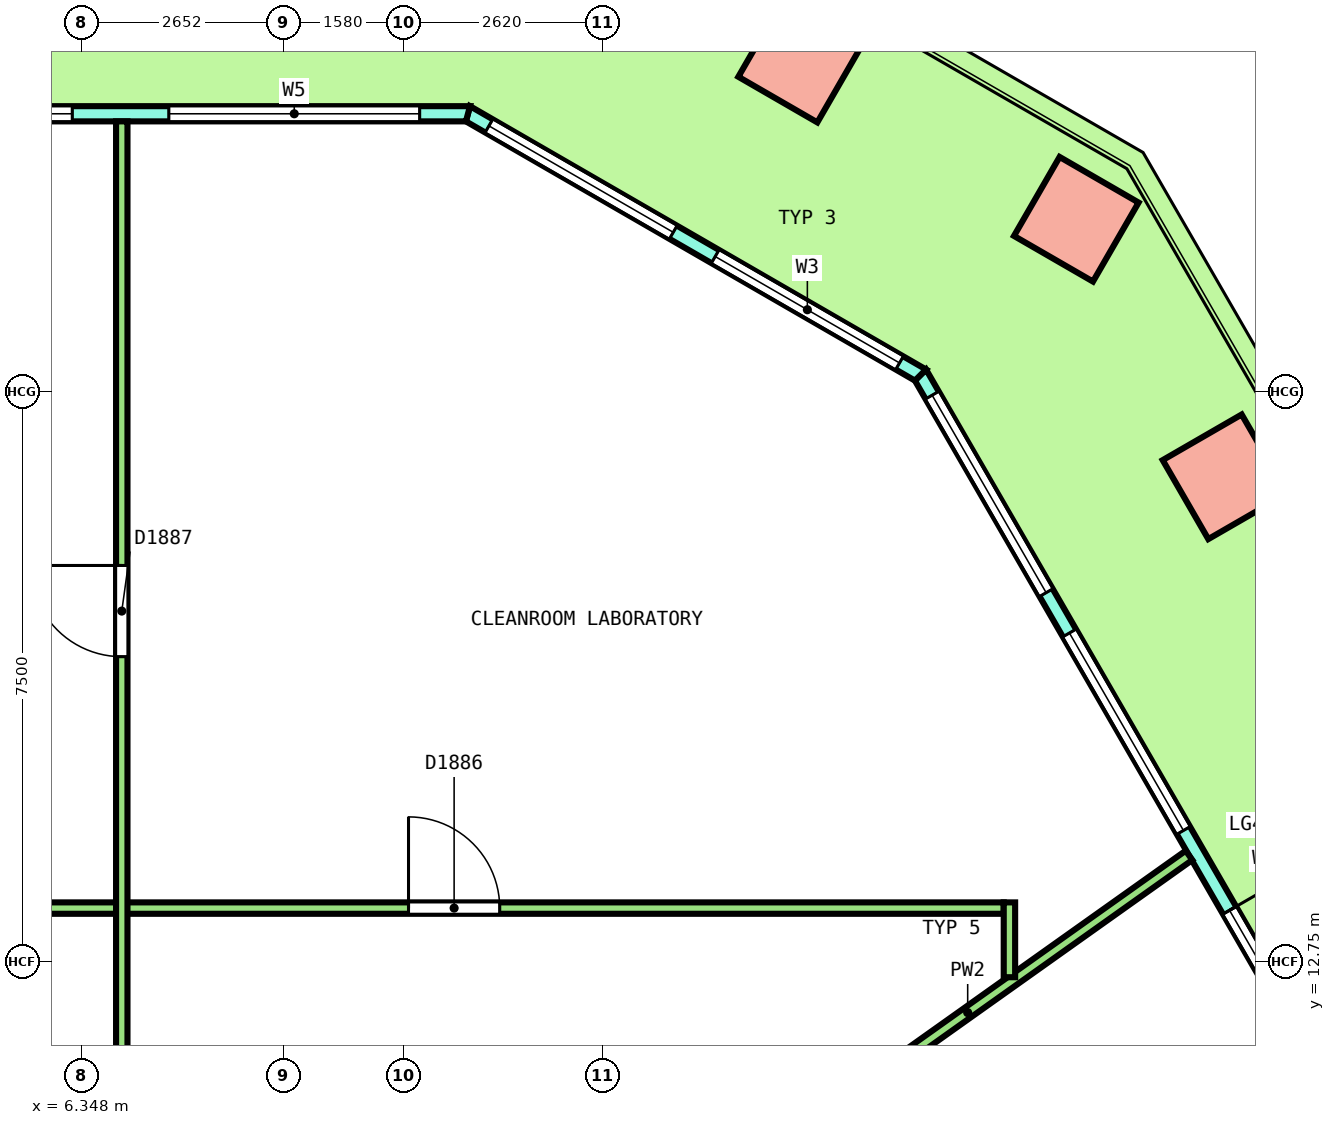
"""IFC4 building model, lengths in metres.
Left out: names, types, materials, properties, quantities, classifications, styles, units other than length and angle.
Written with IfcOpenShell. Run it as: python <this file> out.ifc"""

import sys

from ifc_helpers import new_model, si_unit, direction, frame, frame_2d, origin, origin_2d, place, context, subcontext, project, spatial, polyline, rectangle, outline, extrude, element, fill, save


model = new_model("IFC4")
c1 = context("Model", 3, precision=1e-05, world=origin(), true_north=direction((0.0, 1.0)))
c2 = subcontext(c1, "Body", "Model", "MODEL_VIEW")
j1 = project(units=[si_unit("LENGTHUNIT", "METRE"), si_unit("PLANEANGLEUNIT", "RADIAN")], contexts=[c1])
p1 = place(None, origin())
s1 = spatial("IfcSite", under=j1, at=p1, CompositionType="ELEMENT")
p2 = place(p1, origin())
s2 = spatial("IfcBuilding", under=s1, at=p2, CompositionType="ELEMENT")
p3 = place(p2, frame((0.0, 0.0, 189.2)))
s3 = spatial("IfcBuildingStorey", under=s2, at=p3, CompositionType="ELEMENT", Elevation=189.2)
for number, where, z_axis, x_axis in (
    (1, (21.386, 19.124, 0.0), (0.0, 0.0, 1.0), (-0.5, 0.866, 0.0)),
    (2, (19.43, 22.512, 0.0), (0.0, 0.0, 1.0), (-0.866, 0.5, 0.0)),
    (3, (15.803, 24.606, 0.0), (0.0, 0.0, 1.0), (-0.866, 0.5, 0.0)),
):
    element("IfcColumn", number, at=place(p3, frame(where, z_axis=z_axis, x_axis=x_axis)), inside=s3, PredefinedType="COLUMN", context=c2, shape_type="SweptSolid", body=[
        extrude(rectangle(XDim=1.2, YDim=1.2, at=origin_2d()), origin(), (0.0, 0.0, 1.0), 4.05),
    ])
p4 = place(p3, frame((26.411, 4.82, 0.0), z_axis=(0.0, 0.0, 1.0), x_axis=(-0.500000137386, 0.866025324465, 0.0)))
e4 = element("IfcWall", 4, at=p4, inside=s3, PredefinedType="SOLIDWALL", context=c2, shape_type="SweptSolid", body=[
    extrude(outline(polyline([(-0.027, -0.1), (0.979, -0.1), (1.986, -0.1), (2.992, -0.1), (3.999, -0.1), (5.005, -0.1), (6.012, -0.1), (7.018, -0.1), (8.025, -0.1), (9.031, -0.1), (10.038, -0.1), (11.044, -0.1), (12.051, -0.1), (13.057, -0.1), (14.063, -0.1), (15.07, -0.1), (16.076, -0.1), (17.083, -0.1), (18.089, -0.1), (18.036, 0.1), (17.035, 0.1), (16.035, 0.1), (15.034, 0.1), (14.034, 0.1), (13.033, 0.1), (12.033, 0.1), (11.032, 0.1), (10.032, 0.1), (9.031, 0.1), (8.031, 0.1), (7.03, 0.1), (6.03, 0.1), (5.029, 0.1), (4.029, 0.1), (3.028, 0.1), (2.028, 0.1), (1.027, 0.1), (0.027, 0.1), (-0.027, -0.1)])), origin(), (0.0, 0.0, 1.0), 4.1),
])
p5 = place(p4, frame((0.306, 0.0, 0.1)))
e5 = element("IfcOpeningElement", 5, at=p5, cuts=e4, PredefinedType="OPENING", context=c2, shape_type="SweptSolid", body=[
    extrude(rectangle(XDim=3.0, YDim=2.9, at=frame_2d((1.5, 1.45))), frame((0.0, 0.11, 0.0), z_axis=(0.0, -1.0, 0.0), x_axis=(1.0, 0.0, 0.0)), (0.0, 0.0, 1.0), 0.22),
])
p6 = place(p4, frame((3.919, 0.0, 0.1)))
e6 = element("IfcOpeningElement", 6, at=p6, cuts=e4, PredefinedType="OPENING", context=c2, shape_type="SweptSolid", body=[
    extrude(rectangle(XDim=3.0, YDim=2.9, at=frame_2d((1.5, 1.45))), frame((0.0, 0.11, 0.0), z_axis=(0.0, -1.0, 0.0), x_axis=(1.0, 0.0, 0.0)), (0.0, 0.0, 1.0), 0.22),
])
p7 = place(p4, frame((8.131, 0.0, 0.0)))
e7 = element("IfcOpeningElement", 7, at=p7, cuts=e4, PredefinedType="OPENING", context=c2, shape_type="SweptSolid", body=[
    extrude(rectangle(XDim=1.8, YDim=2.4, at=frame_2d((0.9, 1.2))), frame((0.0, 0.11, 0.0), z_axis=(0.0, -1.0, 0.0), x_axis=(1.0, 0.0, 0.0)), (0.0, 0.0, 1.0), 0.22),
])
p8 = place(p4, frame((8.131, 0.0, 2.55)))
e8 = element("IfcOpeningElement", 8, at=p8, cuts=e4, PredefinedType="OPENING", context=c2, shape_type="SweptSolid", body=[
    extrude(rectangle(XDim=1.8, YDim=0.45, at=frame_2d((0.9, 0.225))), frame((0.0, 0.11, 0.0), z_axis=(0.0, -1.0, 0.0), x_axis=(1.0, 0.0, 0.0)), (0.0, 0.0, 1.0), 0.22),
])
p9 = place(p4, frame((11.144, 0.0, 0.1)))
e9 = element("IfcOpeningElement", 9, at=p9, cuts=e4, PredefinedType="OPENING", context=c2, shape_type="SweptSolid", body=[
    extrude(rectangle(XDim=3.0, YDim=2.9, at=frame_2d((1.5, 1.45))), frame((0.0, 0.11, 0.0), z_axis=(0.0, -1.0, 0.0), x_axis=(1.0, 0.0, 0.0)), (0.0, 0.0, 1.0), 0.22),
])
p10 = place(p4, frame((14.756, 0.0, 0.1)))
e10 = element("IfcOpeningElement", 10, at=p10, cuts=e4, PredefinedType="OPENING", context=c2, shape_type="SweptSolid", body=[
    extrude(rectangle(XDim=3.0, YDim=2.9, at=frame_2d((1.5, 1.45))), frame((0.0, 0.11, 0.0), z_axis=(0.0, -1.0, 0.0), x_axis=(1.0, 0.0, 0.0)), (0.0, 0.0, 1.0), 0.22),
])
p11 = place(p3, frame((17.38, 20.463, 0.0), z_axis=(0.0, 0.0, 1.0), x_axis=(-0.866029458321, 0.49999297727, 0.0)))
e11 = element("IfcWall", 11, at=p11, inside=s3, PredefinedType="SOLIDWALL", context=c2, shape_type="SweptSolid", body=[
    extrude(outline(polyline([(-0.027, -0.1), (1.128, -0.1), (2.282, -0.1), (3.437, -0.1), (4.592, -0.1), (5.747, -0.1), (6.901, -0.1), (6.848, 0.1), (5.711, 0.1), (4.574, 0.1), (3.437, 0.1), (2.301, 0.1), (1.164, 0.1), (0.027, 0.1), (-0.027, -0.1)])), origin(), (0.0, 0.0, 1.0), 4.1),
])
p12 = place(p11, frame((0.319, 0.0, 0.1)))
e12 = element("IfcOpeningElement", 12, at=p12, cuts=e11, PredefinedType="OPENING", context=c2, shape_type="SweptSolid", body=[
    extrude(rectangle(XDim=2.8, YDim=2.9, at=frame_2d((1.4, 1.45))), frame((0.0, 0.11, 0.0), z_axis=(0.0, -1.0, 0.0), x_axis=(1.0, 0.0, 0.0)), (0.0, 0.0, 1.0), 0.22),
])
p13 = place(p11, frame((3.756, 0.0, 0.1)))
e13 = element("IfcOpeningElement", 13, at=p13, cuts=e11, PredefinedType="OPENING", context=c2, shape_type="SweptSolid", body=[
    extrude(rectangle(XDim=2.8, YDim=2.9, at=frame_2d((1.4, 1.45))), frame((0.0, 0.11, 0.0), z_axis=(0.0, -1.0, 0.0), x_axis=(1.0, 0.0, 0.0)), (0.0, 0.0, 1.0), 0.22),
])
p14 = place(p3, frame((11.426, 23.9, 0.0), z_axis=(0.0, 0.0, 1.0), x_axis=(-1.0, 0.0, 0.0)))
e14 = element("IfcWall", 14, at=p14, inside=s3, PredefinedType="SOLIDWALL", context=c2, shape_type="SweptSolid", body=[
    extrude(outline(polyline([(-0.027, -0.1), (1.014, -0.1), (2.055, -0.1), (3.097, -0.1), (4.138, -0.1), (5.179, -0.1), (6.22, -0.1), (7.261, -0.1), (8.303, -0.1), (9.344, -0.1), (10.385, -0.1), (11.426, -0.1), (12.468, -0.1), (13.509, -0.1), (14.55, -0.1), (15.591, -0.1), (16.632, -0.1), (17.673, -0.1), (18.715, -0.1), (19.756, -0.1), (20.797, -0.1), (21.838, -0.1), (22.879, -0.1), (22.826, 0.1), (21.789, 0.1), (20.753, 0.1), (19.717, 0.1), (18.68, 0.1), (17.644, 0.1), (16.608, 0.1), (15.572, 0.1), (14.535, 0.1), (13.499, 0.1), (12.463, 0.1), (11.426, 0.1), (10.39, 0.1), (9.354, 0.1), (8.317, 0.1), (7.281, 0.1), (6.245, 0.1), (5.208, 0.1), (4.172, 0.1), (3.136, 0.1), (2.099, 0.1), (1.063, 0.1), (0.027, 0.1), (-0.027, -0.1)])), origin(), (0.0, 0.0, 1.0), 4.1),
])
p15 = place(p14, frame((0.635, 0.0, 0.1)))
e15 = element("IfcOpeningElement", 15, at=p15, cuts=e14, PredefinedType="OPENING", context=c2, shape_type="SweptSolid", body=[
    extrude(rectangle(XDim=3.3, YDim=2.9, at=frame_2d((1.65, 1.45))), frame((0.0, 0.11, 0.0), z_axis=(0.0, -1.0, 0.0), x_axis=(1.0, 0.0, 0.0)), (0.0, 0.0, 1.0), 0.22),
])
p16 = place(p14, frame((5.206, 0.0, 0.1)))
e16 = element("IfcOpeningElement", 16, at=p16, cuts=e14, PredefinedType="OPENING", context=c2, shape_type="SweptSolid", body=[
    extrude(rectangle(XDim=3.3, YDim=2.9, at=frame_2d((1.65, 1.45))), frame((0.0, 0.11, 0.0), z_axis=(0.0, -1.0, 0.0), x_axis=(1.0, 0.0, 0.0)), (0.0, 0.0, 1.0), 0.22),
])
p17 = place(p14, frame((10.526, 0.0, 0.0)))
e17 = element("IfcOpeningElement", 17, at=p17, cuts=e14, PredefinedType="OPENING", context=c2, shape_type="SweptSolid", body=[
    extrude(rectangle(XDim=1.8, YDim=2.4, at=frame_2d((0.9, 1.2))), frame((0.0, 0.11, 0.0), z_axis=(0.0, -1.0, 0.0), x_axis=(1.0, 0.0, 0.0)), (0.0, 0.0, 1.0), 0.22),
])
p18 = place(p14, frame((10.526, 0.0, 2.55)))
e18 = element("IfcOpeningElement", 18, at=p18, cuts=e14, PredefinedType="OPENING", context=c2, shape_type="SweptSolid", body=[
    extrude(rectangle(XDim=1.8, YDim=0.45, at=frame_2d((0.9, 0.225))), frame((0.0, 0.11, 0.0), z_axis=(0.0, -1.0, 0.0), x_axis=(1.0, 0.0, 0.0)), (0.0, 0.0, 1.0), 0.22),
])
p19 = place(p14, frame((14.347, 0.0, 0.1)))
e19 = element("IfcOpeningElement", 19, at=p19, cuts=e14, PredefinedType="OPENING", context=c2, shape_type="SweptSolid", body=[
    extrude(rectangle(XDim=3.3, YDim=2.9, at=frame_2d((1.65, 1.45))), frame((0.0, 0.11, 0.0), z_axis=(0.0, -1.0, 0.0), x_axis=(1.0, 0.0, 0.0)), (0.0, 0.0, 1.0), 0.22),
])
p20 = place(p14, frame((18.917, 0.0, 0.1)))
e20 = element("IfcOpeningElement", 20, at=p20, cuts=e14, PredefinedType="OPENING", context=c2, shape_type="SweptSolid", body=[
    extrude(rectangle(XDim=3.3, YDim=2.9, at=frame_2d((1.65, 1.45))), frame((0.0, 0.11, 0.0), z_axis=(0.0, -1.0, 0.0), x_axis=(1.0, 0.0, 0.0)), (0.0, 0.0, 1.0), 0.22),
])
p21 = place(p3, frame((15.089, 10.007, 0.0), z_axis=(0.0, 0.0, 1.0), x_axis=(0.815227116073, 0.579141389661, 0.0)))
e21 = element("IfcWall", 21, at=p21, inside=s3, PredefinedType="PARTITIONING", context=c2, shape_type="SweptSolid", body=[
    extrude(rectangle(XDim=7.144, YDim=0.15, at=frame_2d((3.572, 0.0))), origin(), (0.0, 0.0, 1.0), 3.05),
])
p22 = place(p3, frame((-16.979, 13.45, 0.0), z_axis=(0.0, 0.0, 1.0), x_axis=(1.0, 0.0, 0.0)))
e22 = element("IfcWall", 22, at=p22, inside=s3, PredefinedType="PARTITIONING", context=c2, shape_type="SweptSolid", body=[
    extrude(rectangle(XDim=35.454, YDim=0.15, at=frame_2d((17.727, 0.0))), origin(), (0.0, 0.0, 1.0), 3.05),
])
p23 = place(p22, frame((27.623, 0.0, 0.0)))
e23 = element("IfcOpeningElement", 23, at=p23, cuts=e22, PredefinedType="OPENING", context=c2, shape_type="SweptSolid", body=[
    extrude(rectangle(XDim=1.2, YDim=2.1, at=frame_2d((0.6, 1.05))), frame((0.0, 0.085, 0.0), z_axis=(0.0, -1.0, 0.0), x_axis=(1.0, 0.0, 0.0)), (0.0, 0.0, 1.0), 0.17),
])
p24 = place(p3, frame((18.55, 12.541, 0.0), z_axis=(0.0, 0.0, 1.0), x_axis=(0.0, 1.0, 0.0)))
e24 = element("IfcWall", 24, at=p24, inside=s3, PredefinedType="PARTITIONING", context=c2, shape_type="SweptSolid", body=[
    extrude(rectangle(XDim=0.984, YDim=0.15, at=frame_2d((0.492, 0.0))), origin(), (0.0, 0.0, 1.0), 3.05),
])
p25 = place(p3, frame((6.872, 10.125, 0.0), z_axis=(0.0, 0.0, 1.0), x_axis=(0.0, 1.0, 0.0)))
e25 = element("IfcWall", 25, at=p25, inside=s3, PredefinedType="PARTITIONING", context=c2, shape_type="SweptSolid", body=[
    extrude(rectangle(XDim=13.675, YDim=0.15, at=frame_2d((6.837, 0.0))), origin(), (0.0, 0.0, 1.0), 3.05),
])
p26 = place(p25, frame((6.633, 0.0, 0.0)))
e26 = element("IfcOpeningElement", 26, at=p26, cuts=e25, PredefinedType="OPENING", context=c2, shape_type="SweptSolid", body=[
    extrude(rectangle(XDim=1.2, YDim=2.1, at=frame_2d((0.6, 1.05))), frame((0.0, 0.085, 0.0), z_axis=(0.0, -1.0, 0.0), x_axis=(1.0, 0.0, 0.0)), (0.0, 0.0, 1.0), 0.17),
])
p27 = place(p7, origin())
e27 = element("IfcDoor", 27, at=p27, inside=s3, OperationType="DOUBLE_DOOR_SINGLE_SWING", PredefinedType="DOOR", context=c2, shape_type="SweptSolid", body=[
    extrude(rectangle(XDim=1.8, YDim=2.4, at=frame_2d((0.9, 1.2))), frame((0.0, 0.025, 0.0), z_axis=(0.0, -1.0, 0.0), x_axis=(1.0, 0.0, 0.0)), (0.0, 0.0, 1.0), 0.05),
])
fill(e7, e27)
p28 = place(p8, origin())
e28 = element("IfcWindow", 28, at=p28, inside=s3, PartitioningType="SINGLE_PANEL", PredefinedType="WINDOW", context=c2, shape_type="SweptSolid", body=[
    extrude(rectangle(XDim=1.8, YDim=0.45, at=frame_2d((0.9, 0.225))), frame((0.0, 0.03, 0.0), z_axis=(0.0, -1.0, 0.0), x_axis=(1.0, 0.0, 0.0)), (0.0, 0.0, 1.0), 0.06),
])
fill(e8, e28)
p29 = place(p9, origin())
e29 = element("IfcWindow", 29, at=p29, inside=s3, PartitioningType="SINGLE_PANEL", PredefinedType="WINDOW", context=c2, shape_type="SweptSolid", body=[
    extrude(rectangle(XDim=3.0, YDim=2.9, at=frame_2d((1.5, 1.45))), frame((0.0, 0.03, 0.0), z_axis=(0.0, -1.0, 0.0), x_axis=(1.0, 0.0, 0.0)), (0.0, 0.0, 1.0), 0.06),
])
fill(e9, e29)
p30 = place(p10, origin())
e30 = element("IfcWindow", 30, at=p30, inside=s3, PartitioningType="SINGLE_PANEL", PredefinedType="WINDOW", context=c2, shape_type="SweptSolid", body=[
    extrude(rectangle(XDim=3.0, YDim=2.9, at=frame_2d((1.5, 1.45))), frame((0.0, 0.03, 0.0), z_axis=(0.0, -1.0, 0.0), x_axis=(1.0, 0.0, 0.0)), (0.0, 0.0, 1.0), 0.06),
])
fill(e10, e30)
p31 = place(p12, origin())
e31 = element("IfcWindow", 31, at=p31, inside=s3, PartitioningType="SINGLE_PANEL", PredefinedType="WINDOW", context=c2, shape_type="SweptSolid", body=[
    extrude(rectangle(XDim=2.8, YDim=2.9, at=frame_2d((1.4, 1.45))), frame((0.0, 0.03, 0.0), z_axis=(0.0, -1.0, 0.0), x_axis=(1.0, 0.0, 0.0)), (0.0, 0.0, 1.0), 0.06),
])
fill(e12, e31)
p32 = place(p13, origin())
e32 = element("IfcWindow", 32, at=p32, inside=s3, PartitioningType="SINGLE_PANEL", PredefinedType="WINDOW", context=c2, shape_type="SweptSolid", body=[
    extrude(rectangle(XDim=2.8, YDim=2.9, at=frame_2d((1.4, 1.45))), frame((0.0, 0.03, 0.0), z_axis=(0.0, -1.0, 0.0), x_axis=(1.0, 0.0, 0.0)), (0.0, 0.0, 1.0), 0.06),
])
fill(e13, e32)
p33 = place(p15, origin())
e33 = element("IfcWindow", 33, at=p33, inside=s3, PartitioningType="SINGLE_PANEL", PredefinedType="WINDOW", context=c2, shape_type="SweptSolid", body=[
    extrude(rectangle(XDim=3.3, YDim=2.9, at=frame_2d((1.65, 1.45))), frame((0.0, 0.03, 0.0), z_axis=(0.0, -1.0, 0.0), x_axis=(1.0, 0.0, 0.0)), (0.0, 0.0, 1.0), 0.06),
])
fill(e15, e33)
p34 = place(p16, origin())
e34 = element("IfcWindow", 34, at=p34, inside=s3, PartitioningType="SINGLE_PANEL", PredefinedType="WINDOW", context=c2, shape_type="SweptSolid", body=[
    extrude(rectangle(XDim=3.3, YDim=2.9, at=frame_2d((1.65, 1.45))), frame((0.0, 0.03, 0.0), z_axis=(0.0, -1.0, 0.0), x_axis=(1.0, 0.0, 0.0)), (0.0, 0.0, 1.0), 0.06),
])
fill(e16, e34)
p35 = place(p23, origin())
e35 = element("IfcDoor", 35, at=p35, inside=s3, OperationType="DOUBLE_DOOR_SINGLE_SWING", PredefinedType="DOOR", context=c2, shape_type="SweptSolid", body=[
    extrude(rectangle(XDim=1.2, YDim=2.1, at=frame_2d((0.6, 1.05))), frame((0.0, 0.025, 0.0), z_axis=(0.0, -1.0, 0.0), x_axis=(1.0, 0.0, 0.0)), (0.0, 0.0, 1.0), 0.05),
])
fill(e23, e35)
p36 = place(p26, origin())
e36 = element("IfcDoor", 36, at=p36, inside=s3, OperationType="DOUBLE_DOOR_SINGLE_SWING", PredefinedType="DOOR", context=c2, shape_type="SweptSolid", body=[
    extrude(rectangle(XDim=1.2, YDim=2.1, at=frame_2d((0.6, 1.05))), frame((0.0, 0.025, 0.0), z_axis=(0.0, -1.0, 0.0), x_axis=(1.0, 0.0, 0.0)), (0.0, 0.0, 1.0), 0.05),
])
fill(e26, e36)
save(model, sys.argv[1])
